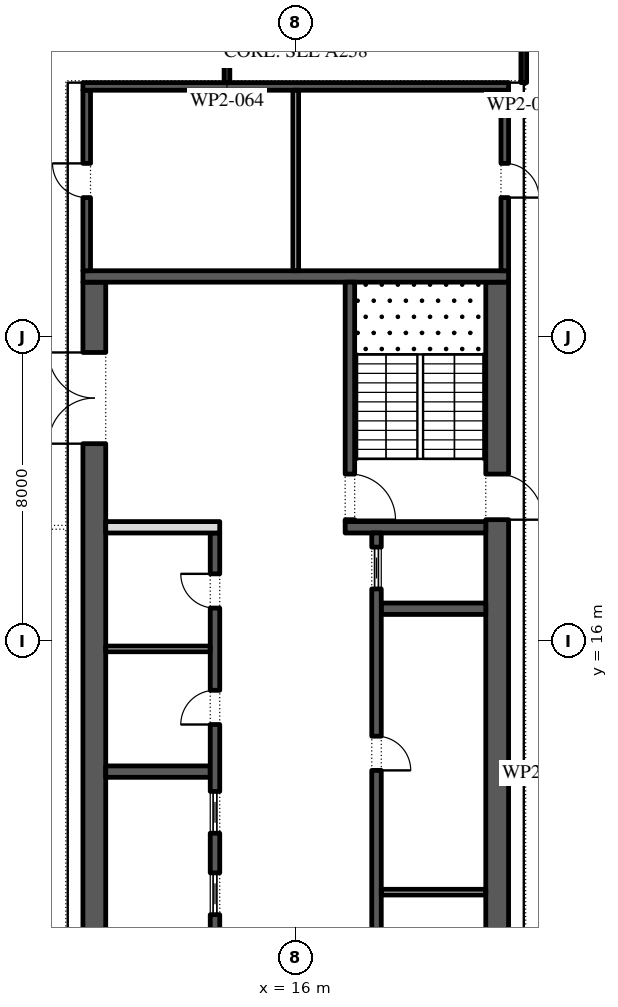
"""IFC4 building model, lengths in metres.
Left out: names, types, materials, properties, quantities, classifications, styles, units other than length and angle.
Written with IfcOpenShell. Run it as: python <this file> out.ifc"""

import sys

from ifc_helpers import new_model, si_unit, direction, frame, frame_2d, origin, place, context, subcontext, project, spatial, rectangle, extrude, element, fill, save


model = new_model("IFC4")
c1 = context("Model", 3, precision=1e-05, world=origin(), true_north=direction((0.0, 1.0)))
c2 = subcontext(c1, "Body", "Model", "MODEL_VIEW")
j1 = project(units=[si_unit("LENGTHUNIT", "METRE"), si_unit("PLANEANGLEUNIT", "RADIAN")], contexts=[c1])
p1 = place(None, origin())
s1 = spatial("IfcSite", under=j1, at=p1, CompositionType="ELEMENT")
p2 = place(p1, origin())
s2 = spatial("IfcBuilding", under=s1, at=p2, CompositionType="ELEMENT")
p3 = place(p2, frame((0.0, 0.0, 255.6)))
s3 = spatial("IfcBuildingStorey", under=s2, at=p3, CompositionType="ELEMENT", Elevation=255.6)
p4 = place(p3, frame((21.359, -11.678, 0.0), z_axis=(0.0, 0.0, 1.0), x_axis=(0.224949198343, 0.974370493275, 0.0)))
e1 = element("IfcWall", 1, at=p4, inside=s3, PredefinedType="STANDARD", context=c2, shape_type="SweptSolid", body=[
    extrude(rectangle(XDim=49.5, YDim=0.3, at=frame_2d((24.75, 0.0))), origin(), (0.0, 0.0, 1.0), 4.0),
])
p5 = place(p4, frame((1.157, 0.0, 0.45)))
e2 = element("IfcOpeningElement", 2, at=p5, cuts=e1, PredefinedType="OPENING", context=c2, shape_type="SweptSolid", body=[
    extrude(rectangle(XDim=4.5, YDim=3.05, at=frame_2d((2.25, 1.525))), frame((0.0, 0.16, 0.0), z_axis=(0.0, -1.0, 0.0), x_axis=(1.0, 0.0, 0.0)), (0.0, 0.0, 1.0), 0.32),
])
p6 = place(p4, frame((8.121, 0.0, 0.45)))
e3 = element("IfcOpeningElement", 3, at=p6, cuts=e1, PredefinedType="OPENING", context=c2, shape_type="SweptSolid", body=[
    extrude(rectangle(XDim=4.5, YDim=3.05, at=frame_2d((2.25, 1.525))), frame((0.0, 0.16, 0.0), z_axis=(0.0, -1.0, 0.0), x_axis=(1.0, 0.0, 0.0)), (0.0, 0.0, 1.0), 0.32),
])
p7 = place(p4, frame((15.236, 0.0, 0.45)))
e4 = element("IfcOpeningElement", 4, at=p7, cuts=e1, PredefinedType="OPENING", context=c2, shape_type="SweptSolid", body=[
    extrude(rectangle(XDim=4.5, YDim=3.05, at=frame_2d((2.25, 1.525))), frame((0.0, 0.16, 0.0), z_axis=(0.0, -1.0, 0.0), x_axis=(1.0, 0.0, 0.0)), (0.0, 0.0, 1.0), 0.32),
])
p8 = place(p4, frame((22.35, 0.0, 0.45)))
e5 = element("IfcOpeningElement", 5, at=p8, cuts=e1, PredefinedType="OPENING", context=c2, shape_type="SweptSolid", body=[
    extrude(rectangle(XDim=4.5, YDim=3.05, at=frame_2d((2.25, 1.525))), frame((0.0, 0.16, 0.0), z_axis=(0.0, -1.0, 0.0), x_axis=(1.0, 0.0, 0.0)), (0.0, 0.0, 1.0), 0.32),
])
p9 = place(p4, frame((29.464, 0.0, 0.45)))
e6 = element("IfcOpeningElement", 6, at=p9, cuts=e1, PredefinedType="OPENING", context=c2, shape_type="SweptSolid", body=[
    extrude(rectangle(XDim=4.5, YDim=2.95, at=frame_2d((2.25, 1.475))), frame((0.0, 0.16, 0.0), z_axis=(0.0, -1.0, 0.0), x_axis=(1.0, 0.0, 0.0)), (0.0, 0.0, 1.0), 0.32),
])
p10 = place(p4, frame((37.628, 0.0, 0.0)))
e7 = element("IfcOpeningElement", 7, at=p10, cuts=e1, PredefinedType="OPENING", context=c2, shape_type="SweptSolid", body=[
    extrude(rectangle(XDim=2.4, YDim=3.325, at=frame_2d((1.2, 1.663))), frame((0.0, 0.16, 0.0), z_axis=(0.0, -1.0, 0.0), x_axis=(1.0, 0.0, 0.0)), (0.0, 0.0, 1.0), 0.32),
])
p11 = place(p4, frame((43.693, 0.0, 0.45)))
e8 = element("IfcOpeningElement", 8, at=p11, cuts=e1, PredefinedType="OPENING", context=c2, shape_type="SweptSolid", body=[
    extrude(rectangle(XDim=4.5, YDim=3.05, at=frame_2d((2.25, 1.525))), frame((0.0, 0.16, 0.0), z_axis=(0.0, -1.0, 0.0), x_axis=(1.0, 0.0, 0.0)), (0.0, 0.0, 1.0), 0.32),
])
p12 = place(p3, frame((21.3, -2.45, 0.0), z_axis=(0.0, 0.0, 1.0), x_axis=(0.0, 1.0, 0.0)))
e9 = element("IfcWall", 9, at=p12, inside=s3, PredefinedType="SHEAR", context=c2, shape_type="SweptSolid", body=[
    extrude(rectangle(XDim=27.9, YDim=0.6, at=frame_2d((13.95, 0.0))), origin(), (0.0, 0.0, 1.0), 4.0),
])
p13 = place(p12, frame((5.05, 0.0, 0.0)))
e10 = element("IfcOpeningElement", 10, at=p13, cuts=e9, PredefinedType="OPENING", context=c2, shape_type="SweptSolid", body=[
    extrude(rectangle(XDim=1.2, YDim=2.1, at=frame_2d((0.6, 1.05))), frame((0.0, 0.31, 0.0), z_axis=(0.0, -1.0, 0.0), x_axis=(1.0, 0.0, 0.0)), (0.0, 0.0, 1.0), 0.62),
])
p14 = place(p12, frame((21.65, 0.0, 0.0)))
e11 = element("IfcOpeningElement", 11, at=p14, cuts=e9, PredefinedType="OPENING", context=c2, shape_type="SweptSolid", body=[
    extrude(rectangle(XDim=1.2, YDim=2.1, at=frame_2d((0.6, 1.05))), frame((0.0, 0.31, 0.0), z_axis=(0.0, -1.0, 0.0), x_axis=(1.0, 0.0, 0.0)), (0.0, 0.0, 1.0), 0.62),
])
p15 = place(p3, frame((10.7, -2.45, 0.0), z_axis=(0.0, 0.0, 1.0), x_axis=(0.0, 1.0, 0.0)))
e12 = element("IfcWall", 12, at=p15, inside=s3, PredefinedType="SHEAR", context=c2, shape_type="SweptSolid", body=[
    extrude(rectangle(XDim=27.9, YDim=0.6, at=frame_2d((13.95, 0.0))), origin(), (0.0, 0.0, 1.0), 4.0),
])
p16 = place(p15, frame((23.65, 0.0, 0.0)))
e13 = element("IfcOpeningElement", 13, at=p16, cuts=e12, PredefinedType="OPENING", context=c2, shape_type="SweptSolid", body=[
    extrude(rectangle(XDim=2.4, YDim=2.1, at=frame_2d((1.2, 1.05))), frame((0.0, 0.31, 0.0), z_axis=(0.0, -1.0, 0.0), x_axis=(1.0, 0.0, 0.0)), (0.0, 0.0, 1.0), 0.62),
])
p17 = place(p15, frame((1.087, 0.0, 0.0)))
e14 = element("IfcOpeningElement", 14, at=p17, cuts=e12, PredefinedType="OPENING", context=c2, shape_type="SweptSolid", body=[
    extrude(rectangle(XDim=0.9, YDim=2.1, at=frame_2d((0.45, 1.05))), frame((0.0, 0.31, 0.0), z_axis=(0.0, -1.0, 0.0), x_axis=(1.0, 0.0, 0.0)), (0.0, 0.0, 1.0), 0.62),
])
p18 = place(p15, frame((4.262, 0.0, 0.0)))
e15 = element("IfcOpeningElement", 15, at=p18, cuts=e12, PredefinedType="OPENING", context=c2, shape_type="SweptSolid", body=[
    extrude(rectangle(XDim=1.0, YDim=2.1, at=frame_2d((0.5, 1.05))), frame((0.0, 0.31, 0.0), z_axis=(0.0, -1.0, 0.0), x_axis=(1.0, 0.0, 0.0)), (0.0, 0.0, 1.0), 0.62),
])
p19 = place(p3, frame((10.4, 25.6, 0.0), z_axis=(0.0, 0.0, 1.0), x_axis=(1.0, 0.0, 0.0)))
e16 = element("IfcWall", 16, at=p19, inside=s3, PredefinedType="SHEAR", context=c2, shape_type="SweptSolid", body=[
    extrude(rectangle(XDim=11.2, YDim=0.3, at=frame_2d((5.6, 0.0))), origin(), (0.0, 0.0, 1.0), 4.0),
])
p20 = place(p3, frame((17.3, 19.0, 0.0), z_axis=(0.0, 0.0, 1.0), x_axis=(1.0, 0.0, 0.0)))
e17 = element("IfcWall", 17, at=p20, inside=s3, PredefinedType="SHEAR", context=c2, shape_type="SweptSolid", body=[
    extrude(rectangle(XDim=3.7, YDim=0.3, at=frame_2d((1.85, 0.0))), origin(), (0.0, 0.0, 1.0), 4.0),
])
p21 = place(p3, frame((17.425, 19.15, 0.0), z_axis=(0.0, 0.0, 1.0), x_axis=(0.0, 1.0, 0.0)))
e18 = element("IfcWall", 18, at=p21, inside=s3, PredefinedType="SHEAR", context=c2, shape_type="SweptSolid", body=[
    extrude(rectangle(XDim=6.3, YDim=0.25, at=frame_2d((3.15, 0.0))), origin(), (0.0, 0.0, 1.0), 4.0),
])
p22 = place(p21, frame((0.05, 0.0, 0.0)))
e19 = element("IfcOpeningElement", 19, at=p22, cuts=e18, PredefinedType="OPENING", context=c2, shape_type="SweptSolid", body=[
    extrude(rectangle(XDim=1.2, YDim=2.1, at=frame_2d((0.6, 1.05))), frame((0.0, 0.135, 0.0), z_axis=(0.0, -1.0, 0.0), x_axis=(1.0, 0.0, 0.0)), (0.0, 0.0, 1.0), 0.27),
])
p23 = place(p3, frame((18.25, 16.857, 0.0), z_axis=(0.0, 0.0, 1.0), x_axis=(1.0, 0.0, 0.0)))
e20 = element("IfcWall", 20, at=p23, inside=s3, PredefinedType="SHEAR", context=c2, shape_type="SweptSolid", body=[
    extrude(rectangle(XDim=2.75, YDim=0.3, at=frame_2d((1.375, 0.0))), origin(), (0.0, 0.0, 1.0), 4.0),
])
p24 = place(p3, frame((18.125, 4.15, 0.0), z_axis=(0.0, 0.0, 1.0), x_axis=(0.0, 1.0, 0.0)))
e21 = element("IfcWall", 21, at=p24, inside=s3, PredefinedType="SHEAR", context=c2, shape_type="SweptSolid", body=[
    extrude(rectangle(XDim=14.7, YDim=0.25, at=frame_2d((7.35, 0.0))), origin(), (0.0, 0.0, 1.0), 4.0),
])
p25 = place(p24, frame((3.246, 0.0, 0.0)))
e22 = element("IfcOpeningElement", 22, at=p25, cuts=e21, PredefinedType="OPENING", context=c2, shape_type="SweptSolid", body=[
    extrude(rectangle(XDim=0.9, YDim=2.1, at=frame_2d((0.45, 1.05))), frame((0.0, 0.135, 0.0), z_axis=(0.0, -1.0, 0.0), x_axis=(1.0, 0.0, 0.0)), (0.0, 0.0, 1.0), 0.27),
])
p26 = place(p24, frame((8.454, 0.0, 0.0)))
e23 = element("IfcOpeningElement", 23, at=p26, cuts=e21, PredefinedType="OPENING", context=c2, shape_type="SweptSolid", body=[
    extrude(rectangle(XDim=0.9, YDim=2.1, at=frame_2d((0.45, 1.05))), frame((0.0, 0.135, 0.0), z_axis=(0.0, -1.0, 0.0), x_axis=(1.0, 0.0, 0.0)), (0.0, 0.0, 1.0), 0.27),
])
p27 = place(p24, frame((0.371, 0.0, 0.0)))
e24 = element("IfcOpeningElement", 24, at=p27, cuts=e21, PredefinedType="OPENING", context=c2, shape_type="SweptSolid", body=[
    extrude(rectangle(XDim=1.1, YDim=2.1, at=frame_2d((0.55, 1.05))), frame((0.0, 0.135, 0.0), z_axis=(0.0, -1.0, 0.0), x_axis=(1.0, 0.0, 0.0)), (0.0, 0.0, 1.0), 0.27),
])
p28 = place(p24, frame((13.229, 0.0, 0.0)))
e25 = element("IfcOpeningElement", 25, at=p28, cuts=e21, PredefinedType="OPENING", context=c2, shape_type="SweptSolid", body=[
    extrude(rectangle(XDim=1.1, YDim=2.1, at=frame_2d((0.55, 1.05))), frame((0.0, 0.135, 0.0), z_axis=(0.0, -1.0, 0.0), x_axis=(1.0, 0.0, 0.0)), (0.0, 0.0, 1.0), 0.27),
])
p29 = place(p3, frame((18.25, 9.4, 0.0), z_axis=(0.0, 0.0, 1.0), x_axis=(1.0, 0.0, 0.0)))
e26 = element("IfcWall", 26, at=p29, inside=s3, PredefinedType="PARTITIONING", context=c2, shape_type="SweptSolid", body=[
    extrude(rectangle(XDim=2.75, YDim=0.15, at=frame_2d((1.375, 0.0))), origin(), (0.0, 0.0, 1.0), 4.0),
])
p30 = place(p3, frame((11.0, 12.571, 0.0), z_axis=(0.0, 0.0, 1.0), x_axis=(1.0, 0.0, 0.0)))
e27 = element("IfcWall", 27, at=p30, inside=s3, PredefinedType="SHEAR", context=c2, shape_type="SweptSolid", body=[
    extrude(rectangle(XDim=2.75, YDim=0.3, at=frame_2d((1.375, 0.0))), origin(), (0.0, 0.0, 1.0), 4.0),
])
p31 = place(p3, frame((13.875, -2.45, 0.0), z_axis=(0.0, 0.0, 1.0), x_axis=(0.0, 1.0, 0.0)))
e28 = element("IfcWall", 28, at=p31, inside=s3, PredefinedType="SHEAR", context=c2, shape_type="SweptSolid", body=[
    extrude(rectangle(XDim=21.3, YDim=0.25, at=frame_2d((10.65, 0.0))), origin(), (0.0, 0.0, 1.0), 4.0),
])
p32 = place(p31, frame((16.261, 0.0, 0.0)))
e29 = element("IfcOpeningElement", 29, at=p32, cuts=e28, PredefinedType="OPENING", context=c2, shape_type="SweptSolid", body=[
    extrude(rectangle(XDim=0.9, YDim=2.1, at=frame_2d((0.45, 1.05))), frame((0.0, 0.135, 0.0), z_axis=(0.0, -1.0, 0.0), x_axis=(1.0, 0.0, 0.0)), (0.0, 0.0, 1.0), 0.27),
])
p33 = place(p31, frame((19.325, 0.0, 0.0)))
e30 = element("IfcOpeningElement", 30, at=p33, cuts=e28, PredefinedType="OPENING", context=c2, shape_type="SweptSolid", body=[
    extrude(rectangle(XDim=0.9, YDim=2.1, at=frame_2d((0.45, 1.05))), frame((0.0, 0.135, 0.0), z_axis=(0.0, -1.0, 0.0), x_axis=(1.0, 0.0, 0.0)), (0.0, 0.0, 1.0), 0.27),
])
p34 = place(p31, frame((6.971, 0.0, 0.0)))
e31 = element("IfcOpeningElement", 31, at=p34, cuts=e28, PredefinedType="OPENING", context=c2, shape_type="SweptSolid", body=[
    extrude(rectangle(XDim=1.1, YDim=2.1, at=frame_2d((0.55, 1.05))), frame((0.0, 0.135, 0.0), z_axis=(0.0, -1.0, 0.0), x_axis=(1.0, 0.0, 0.0)), (0.0, 0.0, 1.0), 0.27),
])
p35 = place(p31, frame((9.114, 0.0, 0.0)))
e32 = element("IfcOpeningElement", 32, at=p35, cuts=e28, PredefinedType="OPENING", context=c2, shape_type="SweptSolid", body=[
    extrude(rectangle(XDim=1.1, YDim=2.1, at=frame_2d((0.55, 1.05))), frame((0.0, 0.135, 0.0), z_axis=(0.0, -1.0, 0.0), x_axis=(1.0, 0.0, 0.0)), (0.0, 0.0, 1.0), 0.27),
])
p36 = place(p31, frame((11.257, 0.0, 0.0)))
e33 = element("IfcOpeningElement", 33, at=p36, cuts=e28, PredefinedType="OPENING", context=c2, shape_type="SweptSolid", body=[
    extrude(rectangle(XDim=1.1, YDim=2.1, at=frame_2d((0.55, 1.05))), frame((0.0, 0.135, 0.0), z_axis=(0.0, -1.0, 0.0), x_axis=(1.0, 0.0, 0.0)), (0.0, 0.0, 1.0), 0.27),
])
p37 = place(p31, frame((13.4, 0.0, 0.0)))
e34 = element("IfcOpeningElement", 34, at=p37, cuts=e28, PredefinedType="OPENING", context=c2, shape_type="SweptSolid", body=[
    extrude(rectangle(XDim=1.1, YDim=2.1, at=frame_2d((0.55, 1.05))), frame((0.0, 0.135, 0.0), z_axis=(0.0, -1.0, 0.0), x_axis=(1.0, 0.0, 0.0)), (0.0, 0.0, 1.0), 0.27),
])
p38 = place(p3, frame((11.0, 19.0, 0.0), z_axis=(0.0, 0.0, 1.0), x_axis=(1.0, 0.0, 0.0)))
e35 = element("IfcWall", 35, at=p38, inside=s3, PredefinedType="PARTITIONING", context=c2, shape_type="SweptSolid", body=[
    extrude(rectangle(XDim=3.0, YDim=0.3, at=frame_2d((1.5, 0.0))), origin(), (0.0, 0.0, 1.0), 4.0),
])
p39 = place(p3, frame((11.0, 15.8, 0.0), z_axis=(0.0, 0.0, 1.0), x_axis=(1.0, 0.0, 0.0)))
e36 = element("IfcWall", 36, at=p39, inside=s3, PredefinedType="PARTITIONING", context=c2, shape_type="SweptSolid", body=[
    extrude(rectangle(XDim=2.75, YDim=0.15, at=frame_2d((1.375, 0.0))), origin(), (0.0, 0.0, 1.0), 4.0),
])
p40 = place(p3, frame((21.5, 25.75, 0.0), z_axis=(0.0, 0.0, 1.0), x_axis=(0.0, 1.0, 0.0)))
e37 = element("IfcWall", 37, at=p40, inside=s3, PredefinedType="SHEAR", context=c2, shape_type="SweptSolid", body=[
    extrude(rectangle(XDim=4.75, YDim=0.2, at=frame_2d((2.375, 0.0))), origin(), (0.0, 0.0, 1.0), 4.0),
])
p41 = place(p40, frame((1.925, 0.0, 0.0)))
e38 = element("IfcOpeningElement", 38, at=p41, cuts=e37, PredefinedType="OPENING", context=c2, shape_type="SweptSolid", body=[
    extrude(rectangle(XDim=0.9, YDim=2.1, at=frame_2d((0.45, 1.05))), frame((0.0, 0.11, 0.0), z_axis=(0.0, -1.0, 0.0), x_axis=(1.0, 0.0, 0.0)), (0.0, 0.0, 1.0), 0.22),
])
p42 = place(p3, frame((10.5, 25.75, 0.0), z_axis=(0.0, 0.0, 1.0), x_axis=(0.0, 1.0, 0.0)))
e39 = element("IfcWall", 39, at=p42, inside=s3, PredefinedType="SHEAR", context=c2, shape_type="SweptSolid", body=[
    extrude(rectangle(XDim=4.75, YDim=0.2, at=frame_2d((2.375, 0.0))), origin(), (0.0, 0.0, 1.0), 4.0),
])
p43 = place(p42, frame((1.925, 0.0, 0.0)))
e40 = element("IfcOpeningElement", 40, at=p43, cuts=e39, PredefinedType="OPENING", context=c2, shape_type="SweptSolid", body=[
    extrude(rectangle(XDim=0.9, YDim=2.1, at=frame_2d((0.45, 1.05))), frame((0.0, 0.11, 0.0), z_axis=(0.0, -1.0, 0.0), x_axis=(1.0, 0.0, 0.0)), (0.0, 0.0, 1.0), 0.22),
])
p44 = place(p3, frame((10.4, 30.6, 0.0), z_axis=(0.0, 0.0, 1.0), x_axis=(1.0, 0.0, 0.0)))
e41 = element("IfcWall", 41, at=p44, inside=s3, PredefinedType="SHEAR", context=c2, shape_type="SweptSolid", body=[
    extrude(rectangle(XDim=11.2, YDim=0.2, at=frame_2d((5.6, 0.0))), origin(), (0.0, 0.0, 1.0), 4.0),
])
p45 = place(p3, frame((16.0, 25.75, 0.0), z_axis=(0.0, 0.0, 1.0), x_axis=(0.0, 1.0, 0.0)))
e42 = element("IfcWall", 42, at=p45, inside=s3, PredefinedType="PARTITIONING", context=c2, shape_type="SweptSolid", body=[
    extrude(rectangle(XDim=4.75, YDim=0.15, at=frame_2d((2.375, 0.0))), origin(), (0.0, 0.0, 1.0), 4.0),
])
p46 = place(p3, frame((14.19, 32.925, 0.0), z_axis=(0.0, 0.0, 1.0), x_axis=(0.0, -1.0, 0.0)))
e43 = element("IfcWall", 43, at=p46, inside=s3, PredefinedType="PARTITIONING", context=c2, shape_type="SweptSolid", body=[
    extrude(rectangle(XDim=2.225, YDim=0.15, at=frame_2d((1.113, 0.0))), origin(), (0.0, 0.0, 1.0), 4.0),
])
p47 = place(p3, frame((22.0, 30.7, 0.0), z_axis=(0.0, 0.0, 1.0), x_axis=(0.0, 1.0, 0.0)))
e44 = element("IfcWall", 44, at=p47, inside=s3, PredefinedType="PARTITIONING", context=c2, shape_type="SweptSolid", body=[
    extrude(rectangle(XDim=2.0, YDim=0.15, at=frame_2d((1.0, 0.0))), origin(), (0.0, 0.0, 1.0), 4.0),
])
p48 = place(p26, frame((0.9, -0.2, 0.0), z_axis=(0.0, 0.0, 1.0), x_axis=(-1.0, 0.0, 0.0)))
e45 = element("IfcDoor", 45, at=p48, inside=s3, OperationType="SINGLE_SWING_LEFT", PredefinedType="DOOR", context=c2, shape_type="SweptSolid", body=[
    extrude(rectangle(XDim=0.9, YDim=2.1, at=frame_2d((0.45, 1.05))), frame((0.0, -0.075, 0.0), z_axis=(0.0, -1.0, 0.0), x_axis=(1.0, 0.0, 0.0)), (0.0, 0.0, 1.0), 0.05),
])
fill(e23, e45)
p49 = place(p28, origin())
e46 = element("IfcDoor", 46, at=p49, inside=s3, OperationType="SLIDING_TO_LEFT", PredefinedType="DOOR", context=c2, shape_type="SweptSolid", body=[
    extrude(rectangle(XDim=1.1, YDim=2.1, at=frame_2d((0.55, 1.05))), frame((0.0, 0.025, 0.0), z_axis=(0.0, -1.0, 0.0), x_axis=(1.0, 0.0, 0.0)), (0.0, 0.0, 1.0), 0.05),
])
fill(e25, e46)
p50 = place(p32, origin())
e47 = element("IfcDoor", 47, at=p50, inside=s3, OperationType="SINGLE_SWING_RIGHT", PredefinedType="DOOR", context=c2, shape_type="SweptSolid", body=[
    extrude(rectangle(XDim=0.9, YDim=2.1, at=frame_2d((0.45, 1.05))), frame((0.0, 0.125, 0.0), z_axis=(0.0, -1.0, 0.0), x_axis=(1.0, 0.0, 0.0)), (0.0, 0.0, 1.0), 0.05),
])
fill(e29, e47)
p51 = place(p33, origin())
e48 = element("IfcDoor", 48, at=p51, inside=s3, OperationType="SINGLE_SWING_LEFT", PredefinedType="DOOR", context=c2, shape_type="SweptSolid", body=[
    extrude(rectangle(XDim=0.9, YDim=2.1, at=frame_2d((0.45, 1.05))), frame((0.0, 0.125, 0.0), z_axis=(0.0, -1.0, 0.0), x_axis=(1.0, 0.0, 0.0)), (0.0, 0.0, 1.0), 0.05),
])
fill(e30, e48)
p52 = place(p36, origin())
e49 = element("IfcDoor", 49, at=p52, inside=s3, OperationType="SLIDING_TO_LEFT", PredefinedType="DOOR", context=c2, shape_type="SweptSolid", body=[
    extrude(rectangle(XDim=1.1, YDim=2.1, at=frame_2d((0.55, 1.05))), frame((0.0, 0.025, 0.0), z_axis=(0.0, -1.0, 0.0), x_axis=(1.0, 0.0, 0.0)), (0.0, 0.0, 1.0), 0.05),
])
fill(e33, e49)
p53 = place(p37, origin())
e50 = element("IfcDoor", 50, at=p53, inside=s3, OperationType="SLIDING_TO_LEFT", PredefinedType="DOOR", context=c2, shape_type="SweptSolid", body=[
    extrude(rectangle(XDim=1.1, YDim=2.1, at=frame_2d((0.55, 1.05))), frame((0.0, 0.025, 0.0), z_axis=(0.0, -1.0, 0.0), x_axis=(1.0, 0.0, 0.0)), (0.0, 0.0, 1.0), 0.05),
])
fill(e34, e50)
p54 = place(p16, origin())
e51 = element("IfcDoor", 51, at=p54, inside=s3, OperationType="DOUBLE_DOOR_SINGLE_SWING", PredefinedType="DOOR", context=c2, shape_type="SweptSolid", body=[
    extrude(rectangle(XDim=2.4, YDim=2.1, at=frame_2d((1.2, 1.05))), frame((0.0, 0.025, 0.0), z_axis=(0.0, -1.0, 0.0), x_axis=(1.0, 0.0, 0.0)), (0.0, 0.0, 1.0), 0.05),
])
fill(e13, e51)
p55 = place(p22, frame((1.2, 0.0, 0.0), z_axis=(0.0, 0.0, 1.0), x_axis=(-1.0, 0.0, 0.0)))
e52 = element("IfcDoor", 52, at=p55, inside=s3, OperationType="SINGLE_SWING_LEFT", PredefinedType="DOOR", context=c2, shape_type="SweptSolid", body=[
    extrude(rectangle(XDim=1.2, YDim=2.1, at=frame_2d((0.6, 1.05))), frame((0.0, 0.025, 0.0), z_axis=(0.0, -1.0, 0.0), x_axis=(1.0, 0.0, 0.0)), (0.0, 0.0, 1.0), 0.05),
])
fill(e19, e52)
p56 = place(p14, frame((1.2, 0.0, 0.0), z_axis=(0.0, 0.0, 1.0), x_axis=(-1.0, 0.0, 0.0)))
e53 = element("IfcDoor", 53, at=p56, inside=s3, OperationType="SINGLE_SWING_LEFT", PredefinedType="DOOR", context=c2, shape_type="SweptSolid", body=[
    extrude(rectangle(XDim=1.2, YDim=2.1, at=frame_2d((0.6, 1.05))), frame((0.0, 0.025, 0.0), z_axis=(0.0, -1.0, 0.0), x_axis=(1.0, 0.0, 0.0)), (0.0, 0.0, 1.0), 0.05),
])
fill(e11, e53)
p57 = place(p41, frame((0.9, 0.15, 0.0), z_axis=(0.0, 0.0, 1.0), x_axis=(-1.0, 0.0, 0.0)))
e54 = element("IfcDoor", 54, at=p57, inside=s3, OperationType="SINGLE_SWING_LEFT", PredefinedType="DOOR", context=c2, shape_type="SweptSolid", body=[
    extrude(rectangle(XDim=0.9, YDim=2.1, at=frame_2d((0.45, 1.05))), frame((0.0, 0.1, 0.0), z_axis=(0.0, -1.0, 0.0), x_axis=(1.0, 0.0, 0.0)), (0.0, 0.0, 1.0), 0.05),
])
fill(e38, e54)
p58 = place(p43, origin())
e55 = element("IfcDoor", 55, at=p58, inside=s3, OperationType="SINGLE_SWING_LEFT", PredefinedType="DOOR", context=c2, shape_type="SweptSolid", body=[
    extrude(rectangle(XDim=0.9, YDim=2.1, at=frame_2d((0.45, 1.05))), frame((0.0, -0.05, 0.0), z_axis=(0.0, -1.0, 0.0), x_axis=(1.0, 0.0, 0.0)), (0.0, 0.0, 1.0), 0.05),
])
fill(e40, e55)
save(model, sys.argv[1])
